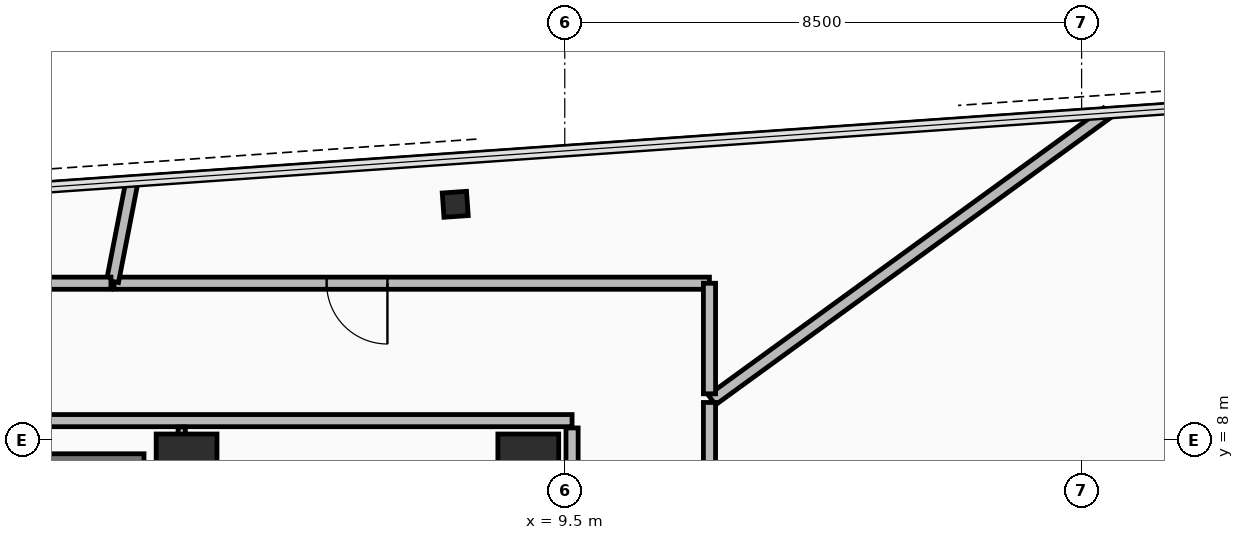
"""IFC4 building model, lengths in metres.
Left out: names, types, materials, properties, quantities, classifications, styles, units other than length and angle.
Written with IfcOpenShell. Run it as: python <this file> out.ifc"""

import sys

from ifc_helpers import new_model, si_unit, direction, frame, frame_2d, origin, origin_2d, place, context, subcontext, project, spatial, rectangle, hollow_rectangle, extrude, element, fill, save


model = new_model("IFC4")
c1 = context("Model", 3, precision=1e-05, world=origin(), true_north=direction((0.0, 1.0)))
c2 = subcontext(c1, "Body", "Model", "MODEL_VIEW")
j1 = project(units=[si_unit("LENGTHUNIT", "METRE"), si_unit("PLANEANGLEUNIT", "RADIAN")], contexts=[c1])
p1 = place(None, origin())
s1 = spatial("IfcSite", under=j1, at=p1, CompositionType="ELEMENT")
p2 = place(p1, origin())
s2 = spatial("IfcBuilding", under=s1, at=p2, CompositionType="ELEMENT")
p3 = place(p2, frame((0.0, 0.0, 267.8)))
s3 = spatial("IfcBuildingStorey", under=s2, at=p3, CompositionType="ELEMENT", Elevation=267.8)
for number, where, z_axis, x_axis in (
    (1, (8.9, 7.6, 0.0), (0.0, 0.0, 1.0), (1.0, 0.0, 0.0)),
    (2, (3.28, 7.6, 0.0), (0.0, 0.0, 1.0), (1.0, 0.0, 0.0)),
):
    element("IfcColumn", number, at=place(p3, frame(where, z_axis=z_axis, x_axis=x_axis)), inside=s3, PredefinedType="COLUMN", context=c2, shape_type="SweptSolid", body=[
        extrude(rectangle(XDim=1.0, YDim=1.0, at=origin_2d()), origin(), (0.0, 0.0, 1.0), 3.6),
    ])
p4 = place(p3, frame((7.699, 11.878, 0.0), z_axis=(0.0, 0.0, 1.0), x_axis=(0.99756392851, 0.069758214822, 0.0)))
e3 = element("IfcColumn", 3, at=p4, inside=s3, PredefinedType="COLUMN", context=c2, shape_type="SweptSolid", body=[
    extrude(hollow_rectangle(XDim=0.4, YDim=0.4, WallThickness=0.025, at=origin_2d()), origin(), (0.0, 0.0, 1.0), 3.6),
])
p5 = place(p3, frame((-2.8, 7.6, 0.0), z_axis=(0.0, 0.0, 1.0), x_axis=(1.0, 0.0, 0.0)))
e4 = element("IfcWall", 4, at=p5, inside=s3, PredefinedType="SHEAR", context=c2, shape_type="SweptSolid", body=[
    extrude(rectangle(XDim=5.38, YDim=0.35, at=frame_2d((2.69, 0.0))), origin(), (0.0, 0.0, 1.0), 3.42),
])
p6 = place(p3, frame((9.62, 8.32, 0.0), z_axis=(0.0, 0.0, 1.0), x_axis=(-1.0, 0.0, 0.0)))
e5 = element("IfcWall", 5, at=p6, inside=s3, PredefinedType="PARTITIONING", context=c2, shape_type="SweptSolid", body=[
    extrude(rectangle(XDim=19.24, YDim=0.2, at=frame_2d((9.62, 0.0))), origin(), (0.0, 0.0, 1.0), 2.915),
])
p7 = place(p6, frame((8.67, 0.0, 0.0)))
e6 = element("IfcOpeningElement", 6, at=p7, cuts=e5, PredefinedType="OPENING", context=c2, shape_type="SweptSolid", body=[
    extrude(rectangle(XDim=0.9, YDim=2.1, at=frame_2d((0.45, 1.05))), frame((0.0, 0.11, 0.0), z_axis=(0.0, -1.0, 0.0), x_axis=(1.0, 0.0, 0.0)), (0.0, 0.0, 1.0), 0.22),
])
p8 = place(p6, frame((15.745, 0.0, 0.0)))
e7 = element("IfcOpeningElement", 7, at=p8, cuts=e5, PredefinedType="OPENING", context=c2, shape_type="SweptSolid", body=[
    extrude(rectangle(XDim=0.9, YDim=2.1, at=frame_2d((0.45, 1.05))), frame((0.0, 0.11, 0.0), z_axis=(0.0, -1.0, 0.0), x_axis=(1.0, 0.0, 0.0)), (0.0, 0.0, 1.0), 0.22),
])
p9 = place(p6, frame((13.795, 0.0, 0.0)))
e8 = element("IfcOpeningElement", 8, at=p9, cuts=e5, PredefinedType="OPENING", context=c2, shape_type="SweptSolid", body=[
    extrude(rectangle(XDim=0.9, YDim=2.1, at=frame_2d((0.45, 1.05))), frame((0.0, 0.11, 0.0), z_axis=(0.0, -1.0, 0.0), x_axis=(1.0, 0.0, 0.0)), (0.0, 0.0, 1.0), 0.22),
])
p10 = place(p3, frame((9.62, -8.2, 0.0), z_axis=(0.0, 0.0, 1.0), x_axis=(0.0, 1.0, 0.0)))
e9 = element("IfcWall", 9, at=p10, inside=s3, PredefinedType="PARTITIONING", context=c2, shape_type="SweptSolid", body=[
    extrude(rectangle(XDim=16.4, YDim=0.2, at=frame_2d((8.2, 0.0))), origin(), (0.0, 0.0, 1.0), 2.915),
])
p11 = place(p10, frame((12.65, 0.0, 0.0)))
e10 = element("IfcOpeningElement", 10, at=p11, cuts=e9, PredefinedType="OPENING", context=c2, shape_type="SweptSolid", body=[
    extrude(rectangle(XDim=1.1, YDim=2.15, at=frame_2d((0.55, 1.075))), frame((0.0, 0.11, 0.0), z_axis=(0.0, -1.0, 0.0), x_axis=(1.0, 0.0, 0.0)), (0.0, 0.0, 1.0), 0.22),
])
p12 = place(p3, frame((3.2, 5.415, 0.0), z_axis=(0.0, 0.0, 1.0), x_axis=(0.0, 1.0, 0.0)))
e11 = element("IfcWall", 11, at=p12, inside=s3, PredefinedType="PARTITIONING", context=c2, shape_type="SweptSolid", body=[
    extrude(rectangle(XDim=2.8, YDim=0.12, at=frame_2d((1.4, 0.0))), origin(), (0.0, 0.0, 1.0), 2.715),
])
p13 = place(p3, frame((11.879, 10.58, 0.0), z_axis=(0.0, 0.0, 1.0), x_axis=(-1.0, 0.0, 0.0)))
e12 = element("IfcWall", 12, at=p13, inside=s3, PredefinedType="PARTITIONING", context=c2, shape_type="SweptSolid", body=[
    extrude(rectangle(XDim=9.792, YDim=0.2, at=frame_2d((4.896, 0.0))), origin(), (0.0, 0.0, 1.0), 2.915),
])
p14 = place(p13, frame((5.296, 0.0, 0.0)))
e13 = element("IfcOpeningElement", 13, at=p14, cuts=e12, PredefinedType="OPENING", context=c2, shape_type="SweptSolid", body=[
    extrude(rectangle(XDim=1.0, YDim=2.15, at=frame_2d((0.5, 1.075))), frame((0.0, 0.11, 0.0), z_axis=(0.0, -1.0, 0.0), x_axis=(1.0, 0.0, 0.0)), (0.0, 0.0, 1.0), 0.22),
])
p15 = place(p3, frame((2.062, 10.61, 0.0), z_axis=(0.0, 0.0, 1.0), x_axis=(0.190794848405, 0.981629933235, 0.0)))
e14 = element("IfcWall", 14, at=p15, inside=s3, PredefinedType="PARTITIONING", context=c2, shape_type="SweptSolid", body=[
    extrude(rectangle(XDim=1.66, YDim=0.2, at=frame_2d((0.83, 0.0))), origin(), (0.0, 0.0, 1.0), 2.765),
])
p16 = place(p3, frame((18.415, 13.379, 0.0), z_axis=(0.0, 0.0, 1.0), x_axis=(-0.809020043839, -0.587781055043, 0.0)))
e15 = element("IfcWall", 15, at=p16, inside=s3, PredefinedType="PARTITIONING", context=c2, shape_type="SweptSolid", body=[
    extrude(rectangle(XDim=8.028, YDim=0.2, at=frame_2d((4.014, 0.0))), origin(), (0.0, 0.0, 1.0), 2.765),
])
p17 = place(p3, frame((11.88, 8.761, 0.0), z_axis=(0.0, 0.0, 1.0), x_axis=(0.0, 1.0, 0.0)))
e16 = element("IfcWall", 16, at=p17, inside=s3, PredefinedType="PARTITIONING", context=c2, shape_type="SweptSolid", body=[
    extrude(rectangle(XDim=1.818, YDim=0.2, at=frame_2d((0.909, 0.0))), origin(), (0.0, 0.0, 1.0), 2.915),
])
p18 = place(p3, frame((2.036, 10.58, 0.0), z_axis=(0.0, 0.0, 1.0), x_axis=(-1.0, 0.0, 0.0)))
e17 = element("IfcWall", 17, at=p18, inside=s3, PredefinedType="PARTITIONING", context=c2, shape_type="SweptSolid", body=[
    extrude(rectangle(XDim=13.811, YDim=0.2, at=frame_2d((6.905, 0.0))), origin(), (0.0, 0.0, 1.0), 2.765),
])
p19 = place(p18, frame((6.405, 0.0, 0.0)))
e18 = element("IfcOpeningElement", 18, at=p19, cuts=e17, PredefinedType="OPENING", context=c2, shape_type="SweptSolid", body=[
    extrude(rectangle(XDim=1.0, YDim=2.15, at=frame_2d((0.5, 1.075))), frame((0.0, 0.11, 0.0), z_axis=(0.0, -1.0, 0.0), x_axis=(1.0, 0.0, 0.0)), (0.0, 0.0, 1.0), 0.22),
])
p20 = place(p3, frame((11.88, -2.289, 0.0), z_axis=(0.0, 0.0, 1.0), x_axis=(0.0, 1.0, 0.0)))
e19 = element("IfcWall", 19, at=p20, inside=s3, PredefinedType="PARTITIONING", context=c2, shape_type="SweptSolid", body=[
    extrude(rectangle(XDim=10.907, YDim=0.2, at=frame_2d((5.454, 0.0))), origin(), (0.0, 0.0, 1.0), 2.915),
])
p21 = place(p20, frame((4.854, 0.0, 0.0)))
e20 = element("IfcOpeningElement", 20, at=p21, cuts=e19, PredefinedType="OPENING", context=c2, shape_type="SweptSolid", body=[
    extrude(rectangle(XDim=1.2, YDim=2.15, at=frame_2d((0.6, 1.075))), frame((0.0, 0.11, 0.0), z_axis=(0.0, -1.0, 0.0), x_axis=(1.0, 0.0, 0.0)), (0.0, 0.0, 1.0), 0.22),
])
p22 = place(p14, origin())
e21 = element("IfcDoor", 21, at=p22, inside=s3, OperationType="SINGLE_SWING_RIGHT", PredefinedType="DOOR", context=c2, shape_type="SweptSolid", body=[
    extrude(rectangle(XDim=1.0, YDim=2.15, at=frame_2d((0.5, 1.075))), frame((0.0, 0.025, 0.0), z_axis=(0.0, -1.0, 0.0), x_axis=(1.0, 0.0, 0.0)), (0.0, 0.0, 1.0), 0.05),
])
fill(e13, e21)
save(model, sys.argv[1])
